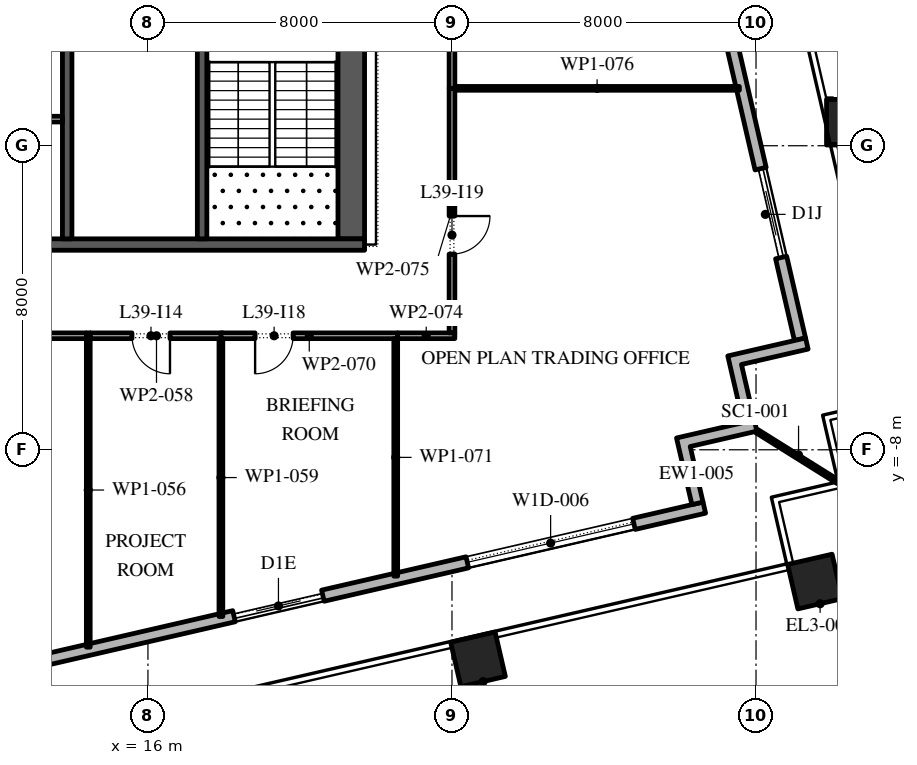
"""IFC4 building model, lengths in metres.
Left out: names, types, materials, properties, quantities, classifications, styles, units other than length and angle.
Written with IfcOpenShell. Run it as: python <this file> out.ifc"""

import sys

from ifc_helpers import new_model, si_unit, direction, frame, frame_2d, origin, origin_2d, place, context, subcontext, project, spatial, polyline, rectangle, outline, extrude, element, fill, save


model = new_model("IFC4")
c1 = context("Model", 3, precision=1e-05, world=origin(), true_north=direction((0.0, 1.0)))
c2 = subcontext(c1, "Body", "Model", "MODEL_VIEW")
j1 = project(units=[si_unit("LENGTHUNIT", "METRE"), si_unit("PLANEANGLEUNIT", "RADIAN")], contexts=[c1])
p1 = place(None, origin())
s1 = spatial("IfcSite", under=j1, at=p1, CompositionType="ELEMENT")
p2 = place(p1, origin())
s2 = spatial("IfcBuilding", under=s1, at=p2, CompositionType="ELEMENT")
p3 = place(p2, frame((0.0, 0.0, 180.0)))
s3 = spatial("IfcBuildingStorey", under=s2, at=p3, CompositionType="ELEMENT", Elevation=180.0)
for number, where, z_axis, x_axis in (
    (1, (24.685, -13.514, 0.0), (0.0, 0.0, 1.0), (0.974, 0.225, 0.0)),
    (2, (33.551, -11.467, 0.0), (0.0, 0.0, 1.0), (0.974, 0.225, 0.0)),
):
    element("IfcColumn", number, at=place(p3, frame(where, z_axis=z_axis, x_axis=x_axis)), inside=s3, PredefinedType="COLUMN", context=c2, shape_type="SweptSolid", body=[
        extrude(rectangle(XDim=1.2, YDim=1.2, at=origin_2d()), origin(), (0.0, 0.0, 1.0), 4.2),
    ])
p4 = place(p3, frame((34.456, 0.619, 0.0), z_axis=(-0.002731884952, 0.01168316756, 0.999928017609), x_axis=(-0.973733900744, -0.227689021567, 0.0)))
e3 = element("IfcColumn", 3, at=p4, inside=s3, PredefinedType="COLUMN", context=c2, shape_type="SweptSolid", body=[
    extrude(rectangle(XDim=1.2, YDim=1.2, at=origin_2d()), origin(), (0.0, 0.0, 1.0), 4.2),
])
p5 = place(p3, frame((-17.592, -20.657, 0.0), z_axis=(0.0, 0.0, 1.0), x_axis=(0.974370243697, 0.224950279389, 0.0)))
e4 = element("IfcWall", 4, at=p5, inside=s3, PredefinedType="STANDARD", context=c2, shape_type="SweptSolid", body=[
    extrude(rectangle(XDim=49.5, YDim=0.3, at=frame_2d((24.75, 0.0))), origin(), (0.0, 0.0, 1.0), 4.0),
])
p6 = place(p5, frame((3.6, 0.0, 0.0)))
e5 = element("IfcOpeningElement", 5, at=p6, cuts=e4, PredefinedType="OPENING", context=c2, shape_type="SweptSolid", body=[
    extrude(rectangle(XDim=2.4, YDim=3.5, at=frame_2d((1.2, 1.75))), frame((0.0, 0.16, 0.0), z_axis=(0.0, -1.0, 0.0), x_axis=(1.0, 0.0, 0.0)), (0.0, 0.0, 1.0), 0.32),
])
p7 = place(p5, frame((9.9, 0.0, 0.45)))
e6 = element("IfcOpeningElement", 6, at=p7, cuts=e4, PredefinedType="OPENING", context=c2, shape_type="SweptSolid", body=[
    extrude(rectangle(XDim=4.5, YDim=2.575, at=frame_2d((2.25, 1.288))), frame((0.0, 0.16, 0.0), z_axis=(0.0, -1.0, 0.0), x_axis=(1.0, 0.0, 0.0)), (0.0, 0.0, 1.0), 0.32),
])
p8 = place(p5, frame((18.2, 0.0, 0.45)))
e7 = element("IfcOpeningElement", 7, at=p8, cuts=e4, PredefinedType="OPENING", context=c2, shape_type="SweptSolid", body=[
    extrude(rectangle(XDim=4.5, YDim=3.05, at=frame_2d((2.25, 1.525))), frame((0.0, 0.16, 0.0), z_axis=(0.0, -1.0, 0.0), x_axis=(1.0, 0.0, 0.0)), (0.0, 0.0, 1.0), 0.32),
])
p9 = place(p5, frame((26.5, 0.0, 0.45)))
e8 = element("IfcOpeningElement", 8, at=p9, cuts=e4, PredefinedType="OPENING", context=c2, shape_type="SweptSolid", body=[
    extrude(rectangle(XDim=4.5, YDim=2.75, at=frame_2d((2.25, 1.375))), frame((0.0, 0.16, 0.0), z_axis=(0.0, -1.0, 0.0), x_axis=(1.0, 0.0, 0.0)), (0.0, 0.0, 1.0), 0.32),
])
p10 = place(p5, frame((36.8, 0.0, 0.0)))
e9 = element("IfcOpeningElement", 9, at=p10, cuts=e4, PredefinedType="OPENING", context=c2, shape_type="SweptSolid", body=[
    extrude(rectangle(XDim=2.4, YDim=3.275, at=frame_2d((1.2, 1.637))), frame((0.0, 0.16, 0.0), z_axis=(0.0, -1.0, 0.0), x_axis=(1.0, 0.0, 0.0)), (0.0, 0.0, 1.0), 0.32),
])
p11 = place(p5, frame((43.1, 0.0, 0.45)))
e10 = element("IfcOpeningElement", 10, at=p11, cuts=e4, PredefinedType="OPENING", context=c2, shape_type="SweptSolid", body=[
    extrude(rectangle(XDim=4.5, YDim=2.875, at=frame_2d((2.25, 1.438))), frame((0.0, 0.16, 0.0), z_axis=(0.0, -1.0, 0.0), x_axis=(1.0, 0.0, 0.0)), (0.0, 0.0, 1.0), 0.32),
])
p12 = place(p3, frame((33.157, -5.092, 0.0), z_axis=(0.0, 0.0, 1.0), x_axis=(-0.224950279389, 0.974370243697, 0.0)))
e11 = element("IfcWall", 11, at=p12, inside=s3, PredefinedType="STANDARD", context=c2, shape_type="SweptSolid", body=[
    extrude(rectangle(XDim=49.5, YDim=0.3, at=frame_2d((24.75, 0.0))), origin(), (0.0, 0.0, 1.0), 4.0),
])
p13 = place(p12, frame((2.207, 0.0, 0.0)))
e12 = element("IfcOpeningElement", 12, at=p13, cuts=e11, PredefinedType="OPENING", context=c2, shape_type="SweptSolid", body=[
    extrude(rectangle(XDim=2.4, YDim=3.125, at=frame_2d((1.2, 1.562))), frame((0.0, 0.16, 0.0), z_axis=(0.0, -1.0, 0.0), x_axis=(1.0, 0.0, 0.0)), (0.0, 0.0, 1.0), 0.32),
])
p14 = place(p12, frame((8.121, 0.0, 0.45)))
e13 = element("IfcOpeningElement", 13, at=p14, cuts=e11, PredefinedType="OPENING", context=c2, shape_type="SweptSolid", body=[
    extrude(rectangle(XDim=4.5, YDim=2.875, at=frame_2d((2.25, 1.438))), frame((0.0, 0.16, 0.0), z_axis=(0.0, -1.0, 0.0), x_axis=(1.0, 0.0, 0.0)), (0.0, 0.0, 1.0), 0.32),
])
p15 = place(p12, frame((15.236, 0.0, 0.45)))
e14 = element("IfcOpeningElement", 14, at=p15, cuts=e11, PredefinedType="OPENING", context=c2, shape_type="SweptSolid", body=[
    extrude(rectangle(XDim=4.5, YDim=2.875, at=frame_2d((2.25, 1.438))), frame((0.0, 0.16, 0.0), z_axis=(0.0, -1.0, 0.0), x_axis=(1.0, 0.0, 0.0)), (0.0, 0.0, 1.0), 0.32),
])
p16 = place(p12, frame((22.35, 0.0, 0.45)))
e15 = element("IfcOpeningElement", 15, at=p16, cuts=e11, PredefinedType="OPENING", context=c2, shape_type="SweptSolid", body=[
    extrude(rectangle(XDim=4.5, YDim=3.0, at=frame_2d((2.25, 1.5))), frame((0.0, 0.16, 0.0), z_axis=(0.0, -1.0, 0.0), x_axis=(1.0, 0.0, 0.0)), (0.0, 0.0, 1.0), 0.32),
])
p17 = place(p12, frame((30.514, 0.0, 0.0)))
e16 = element("IfcOpeningElement", 16, at=p17, cuts=e11, PredefinedType="OPENING", context=c2, shape_type="SweptSolid", body=[
    extrude(rectangle(XDim=2.4, YDim=3.45, at=frame_2d((1.2, 1.725))), frame((0.0, 0.16, 0.0), z_axis=(0.0, -1.0, 0.0), x_axis=(1.0, 0.0, 0.0)), (0.0, 0.0, 1.0), 0.32),
])
p18 = place(p12, frame((36.579, 0.0, 0.45)))
e17 = element("IfcOpeningElement", 17, at=p18, cuts=e11, PredefinedType="OPENING", context=c2, shape_type="SweptSolid", body=[
    extrude(rectangle(XDim=4.5, YDim=3.05, at=frame_2d((2.25, 1.525))), frame((0.0, 0.16, 0.0), z_axis=(0.0, -1.0, 0.0), x_axis=(1.0, 0.0, 0.0)), (0.0, 0.0, 1.0), 0.32),
])
p19 = place(p12, frame((43.693, 0.0, 0.45)))
e18 = element("IfcOpeningElement", 18, at=p19, cuts=e11, PredefinedType="OPENING", context=c2, shape_type="SweptSolid", body=[
    extrude(rectangle(XDim=4.5, YDim=3.05, at=frame_2d((2.25, 1.525))), frame((0.0, 0.16, 0.0), z_axis=(0.0, -1.0, 0.0), x_axis=(1.0, 0.0, 0.0)), (0.0, 0.0, 1.0), 0.32),
])
p20 = place(p3, origin())
e19 = element("IfcWall", 19, at=p20, inside=s3, PredefinedType="STANDARD", context=c2, shape_type="SweptSolid", body=[
    extrude(outline(polyline([(31.662, -7.285), (31.257, -5.531), (33.303, -5.058), (33.371, -5.351), (31.617, -5.756), (32.022, -7.51), (30.268, -7.914), (30.605, -9.376), (30.313, -9.443), (29.908, -7.69), (31.662, -7.285)])), origin(), (0.0, 0.0, 1.0), 4.0),
])
p21 = place(p3, frame((32.022, -7.51, -0.05), z_axis=(0.0, 0.0, 1.0), x_axis=(0.848047176257, -0.529920736377, 0.0)))
e20 = element("IfcWall", 20, at=p21, inside=s3, PredefinedType="STANDARD", context=c2, shape_type="SweptSolid", body=[
    extrude(rectangle(XDim=2.526, YDim=0.1, at=frame_2d((1.263, 0.0))), origin(), (0.0, 0.0, 1.0), 4.05),
])
p22 = place(p3, frame((21.35, -2.45, 0.0), z_axis=(0.0, 0.0, 1.0), x_axis=(0.0, 1.0, 0.0)))
e21 = element("IfcWall", 21, at=p22, inside=s3, PredefinedType="SHEAR", context=c2, shape_type="SweptSolid", body=[
    extrude(rectangle(XDim=27.9, YDim=0.7, at=frame_2d((13.95, 0.0))), origin(), (0.0, 0.0, 1.0), 4.0),
])
p23 = place(p22, frame((5.05, 0.0, 0.0)))
e22 = element("IfcOpeningElement", 22, at=p23, cuts=e21, PredefinedType="OPENING", context=c2, shape_type="SweptSolid", body=[
    extrude(rectangle(XDim=1.2, YDim=2.1, at=frame_2d((0.6, 1.05))), frame((0.0, 0.36, 0.0), z_axis=(0.0, -1.0, 0.0), x_axis=(1.0, 0.0, 0.0)), (0.0, 0.0, 1.0), 0.72),
])
p24 = place(p22, frame((21.65, 0.0, 0.0)))
e23 = element("IfcOpeningElement", 23, at=p24, cuts=e21, PredefinedType="OPENING", context=c2, shape_type="SweptSolid", body=[
    extrude(rectangle(XDim=1.2, YDim=2.1, at=frame_2d((0.6, 1.05))), frame((0.0, 0.36, 0.0), z_axis=(0.0, -1.0, 0.0), x_axis=(1.0, 0.0, 0.0)), (0.0, 0.0, 1.0), 0.72),
])
p25 = place(p3, frame((10.3, -2.6, 0.0), z_axis=(0.0, 0.0, 1.0), x_axis=(1.0, 0.0, 0.0)))
e24 = element("IfcWall", 24, at=p25, inside=s3, PredefinedType="SHEAR", context=c2, shape_type="SweptSolid", body=[
    extrude(rectangle(XDim=11.4, YDim=0.3, at=frame_2d((5.7, 0.0))), origin(), (0.0, 0.0, 1.0), 4.0),
])
p26 = place(p3, frame((17.425, -2.45, 0.0), z_axis=(0.0, 0.0, 1.0), x_axis=(0.0, 1.0, 0.0)))
e25 = element("IfcWall", 25, at=p26, inside=s3, PredefinedType="SHEAR", context=c2, shape_type="SweptSolid", body=[
    extrude(rectangle(XDim=6.3, YDim=0.25, at=frame_2d((3.15, 0.0))), origin(), (0.0, 0.0, 1.0), 4.0),
])
p27 = place(p26, frame((5.05, 0.0, 0.0)))
e26 = element("IfcOpeningElement", 26, at=p27, cuts=e25, PredefinedType="OPENING", context=c2, shape_type="SweptSolid", body=[
    extrude(rectangle(XDim=1.2, YDim=2.1, at=frame_2d((0.6, 1.05))), frame((0.0, 0.135, 0.0), z_axis=(0.0, -1.0, 0.0), x_axis=(1.0, 0.0, 0.0)), (0.0, 0.0, 1.0), 0.27),
])
p28 = place(p3, frame((13.875, -2.45, 0.0), z_axis=(0.0, 0.0, 1.0), x_axis=(0.0, 1.0, 0.0)))
e27 = element("IfcWall", 27, at=p28, inside=s3, PredefinedType="SHEAR", context=c2, shape_type="SweptSolid", body=[
    extrude(rectangle(XDim=21.3, YDim=0.25, at=frame_2d((10.65, 0.0))), origin(), (0.0, 0.0, 1.0), 4.0),
])
p29 = place(p28, frame((16.261, 0.0, 0.0)))
e28 = element("IfcOpeningElement", 28, at=p29, cuts=e27, PredefinedType="OPENING", context=c2, shape_type="SweptSolid", body=[
    extrude(rectangle(XDim=0.9, YDim=2.1, at=frame_2d((0.45, 1.05))), frame((0.0, 0.135, 0.0), z_axis=(0.0, -1.0, 0.0), x_axis=(1.0, 0.0, 0.0)), (0.0, 0.0, 1.0), 0.27),
])
p30 = place(p28, frame((19.325, 0.0, 0.0)))
e29 = element("IfcOpeningElement", 29, at=p30, cuts=e27, PredefinedType="OPENING", context=c2, shape_type="SweptSolid", body=[
    extrude(rectangle(XDim=0.9, YDim=2.1, at=frame_2d((0.45, 1.05))), frame((0.0, 0.135, 0.0), z_axis=(0.0, -1.0, 0.0), x_axis=(1.0, 0.0, 0.0)), (0.0, 0.0, 1.0), 0.27),
])
p31 = place(p28, frame((6.971, 0.0, 0.0)))
e30 = element("IfcOpeningElement", 30, at=p31, cuts=e27, PredefinedType="OPENING", context=c2, shape_type="SweptSolid", body=[
    extrude(rectangle(XDim=1.1, YDim=2.1, at=frame_2d((0.55, 1.05))), frame((0.0, 0.135, 0.0), z_axis=(0.0, -1.0, 0.0), x_axis=(1.0, 0.0, 0.0)), (0.0, 0.0, 1.0), 0.27),
])
p32 = place(p28, frame((9.114, 0.0, 0.0)))
e31 = element("IfcOpeningElement", 31, at=p32, cuts=e27, PredefinedType="OPENING", context=c2, shape_type="SweptSolid", body=[
    extrude(rectangle(XDim=1.1, YDim=2.1, at=frame_2d((0.55, 1.05))), frame((0.0, 0.135, 0.0), z_axis=(0.0, -1.0, 0.0), x_axis=(1.0, 0.0, 0.0)), (0.0, 0.0, 1.0), 0.27),
])
p33 = place(p28, frame((11.257, 0.0, 0.0)))
e32 = element("IfcOpeningElement", 32, at=p33, cuts=e27, PredefinedType="OPENING", context=c2, shape_type="SweptSolid", body=[
    extrude(rectangle(XDim=1.1, YDim=2.1, at=frame_2d((0.55, 1.05))), frame((0.0, 0.135, 0.0), z_axis=(0.0, -1.0, 0.0), x_axis=(1.0, 0.0, 0.0)), (0.0, 0.0, 1.0), 0.27),
])
p34 = place(p28, frame((13.4, 0.0, 0.0)))
e33 = element("IfcOpeningElement", 33, at=p34, cuts=e27, PredefinedType="OPENING", context=c2, shape_type="SweptSolid", body=[
    extrude(rectangle(XDim=1.1, YDim=2.1, at=frame_2d((0.55, 1.05))), frame((0.0, 0.135, 0.0), z_axis=(0.0, -1.0, 0.0), x_axis=(1.0, 0.0, 0.0)), (0.0, 0.0, 1.0), 0.27),
])
p35 = place(p3, frame((11.0, 0.7, 0.0), z_axis=(0.0, 0.0, 1.0), x_axis=(1.0, 0.0, 0.0)))
e34 = element("IfcWall", 34, at=p35, inside=s3, PredefinedType="PARTITIONING", context=c2, shape_type="SweptSolid", body=[
    extrude(rectangle(XDim=2.75, YDim=0.15, at=frame_2d((1.375, 0.0))), origin(), (0.0, 0.0, 1.0), 4.0),
])
p36 = place(p3, frame((14.43, -13.193, 0.0), z_axis=(0.0, 0.0, 1.0), x_axis=(0.0, 1.0, 0.0)))
e35 = element("IfcWall", 35, at=p36, inside=s3, PredefinedType="PARTITIONING", context=c2, shape_type="SweptSolid", body=[
    extrude(rectangle(XDim=8.268, YDim=0.1, at=frame_2d((4.134, 0.0))), origin(), (0.0, 0.0, 1.0), 4.0),
])
p37 = place(p3, frame((14.38, -5.0, 0.0), z_axis=(0.0, 0.0, 1.0), x_axis=(-1.0, 0.0, 0.0)))
e36 = element("IfcWall", 36, at=p37, inside=s3, PredefinedType="PARTITIONING", context=c2, shape_type="SweptSolid", body=[
    extrude(rectangle(XDim=4.38, YDim=0.15, at=frame_2d((2.19, 0.0))), origin(), (0.0, 0.0, 1.0), 4.0),
])
p38 = place(p37, frame((1.73, 0.0, 0.0)))
e37 = element("IfcOpeningElement", 37, at=p38, cuts=e36, PredefinedType="OPENING", context=c2, shape_type="SweptSolid", body=[
    extrude(rectangle(XDim=1.0, YDim=2.1, at=frame_2d((0.5, 1.05))), frame((0.0, 0.085, 0.0), z_axis=(0.0, -1.0, 0.0), x_axis=(1.0, 0.0, 0.0)), (0.0, 0.0, 1.0), 0.17),
])
p39 = place(p3, frame((17.97, -5.0, 0.0), z_axis=(0.0, 0.0, 1.0), x_axis=(-1.0, 0.0, 0.0)))
e38 = element("IfcWall", 38, at=p39, inside=s3, PredefinedType="PARTITIONING", context=c2, shape_type="SweptSolid", body=[
    extrude(rectangle(XDim=3.49, YDim=0.15, at=frame_2d((1.745, 0.0))), origin(), (0.0, 0.0, 1.0), 4.0),
])
p40 = place(p39, frame((1.39, 0.0, 0.0)))
e39 = element("IfcOpeningElement", 39, at=p40, cuts=e38, PredefinedType="OPENING", context=c2, shape_type="SweptSolid", body=[
    extrude(rectangle(XDim=1.0, YDim=2.1, at=frame_2d((0.5, 1.05))), frame((0.0, 0.085, 0.0), z_axis=(0.0, -1.0, 0.0), x_axis=(1.0, 0.0, 0.0)), (0.0, 0.0, 1.0), 0.17),
])
p41 = place(p3, frame((17.92, -5.075, 0.0), z_axis=(0.0, 0.0, 1.0), x_axis=(0.0, -1.0, 0.0)))
e40 = element("IfcWall", 40, at=p41, inside=s3, PredefinedType="PARTITIONING", context=c2, shape_type="SweptSolid", body=[
    extrude(rectangle(XDim=7.312, YDim=0.1, at=frame_2d((3.656, 0.0))), origin(), (0.0, 0.0, 1.0), 4.0),
])
p42 = place(p3, frame((22.57, -5.0, 0.0), z_axis=(0.0, 0.0, 1.0), x_axis=(-1.0, 0.0, 0.0)))
e41 = element("IfcWall", 41, at=p42, inside=s3, PredefinedType="PARTITIONING", context=c2, shape_type="SweptSolid", body=[
    extrude(rectangle(XDim=4.65, YDim=0.15, at=frame_2d((2.325, 0.0))), origin(), (0.0, 0.0, 1.0), 4.0),
])
p43 = place(p42, frame((2.75, 0.0, 0.0)))
e42 = element("IfcOpeningElement", 42, at=p43, cuts=e41, PredefinedType="OPENING", context=c2, shape_type="SweptSolid", body=[
    extrude(rectangle(XDim=1.0, YDim=2.1, at=frame_2d((0.5, 1.05))), frame((0.0, 0.085, 0.0), z_axis=(0.0, -1.0, 0.0), x_axis=(1.0, 0.0, 0.0)), (0.0, 0.0, 1.0), 0.17),
])
p44 = place(p3, frame((22.52, -5.075, 0.0), z_axis=(0.0, 0.0, 1.0), x_axis=(0.0, -1.0, 0.0)))
e43 = element("IfcWall", 43, at=p44, inside=s3, PredefinedType="PARTITIONING", context=c2, shape_type="SweptSolid", body=[
    extrude(rectangle(XDim=6.25, YDim=0.1, at=frame_2d((3.125, 0.0))), origin(), (0.0, 0.0, 1.0), 4.0),
])
p45 = place(p3, frame((24.075, -5.0, 0.0), z_axis=(0.0, 0.0, 1.0), x_axis=(-1.0, 0.0, 0.0)))
e44 = element("IfcWall", 44, at=p45, inside=s3, PredefinedType="PARTITIONING", context=c2, shape_type="SweptSolid", body=[
    extrude(rectangle(XDim=1.505, YDim=0.15, at=frame_2d((0.752, 0.0))), origin(), (0.0, 0.0, 1.0), 4.0),
])
p46 = place(p3, frame((24.0, 1.51, 0.0), z_axis=(0.0, 0.0, 1.0), x_axis=(0.0, -1.0, 0.0)))
e45 = element("IfcWall", 45, at=p46, inside=s3, PredefinedType="PARTITIONING", context=c2, shape_type="SweptSolid", body=[
    extrude(rectangle(XDim=6.435, YDim=0.15, at=frame_2d((3.218, 0.0))), origin(), (0.0, 0.0, 1.0), 4.0),
])
p47 = place(p46, frame((3.36, 0.0, 0.0)))
e46 = element("IfcOpeningElement", 46, at=p47, cuts=e45, PredefinedType="OPENING", context=c2, shape_type="SweptSolid", body=[
    extrude(rectangle(XDim=1.0, YDim=2.1, at=frame_2d((0.5, 1.05))), frame((0.0, 0.085, 0.0), z_axis=(0.0, -1.0, 0.0), x_axis=(1.0, 0.0, 0.0)), (0.0, 0.0, 1.0), 0.17),
])
p48 = place(p3, frame((24.075, 1.51, 0.0), z_axis=(0.0, 0.0, 1.0), x_axis=(1.0, 0.0, 0.0)))
e47 = element("IfcWall", 47, at=p48, inside=s3, PredefinedType="PARTITIONING", context=c2, shape_type="SweptSolid", body=[
    extrude(rectangle(XDim=7.487, YDim=0.1, at=frame_2d((3.744, 0.0))), origin(), (0.0, 0.0, 1.0), 4.0),
])
p49 = place(p3, frame((24.0, 8.5, 0.0), z_axis=(0.0, 0.0, 1.0), x_axis=(0.0, -1.0, 0.0)))
e48 = element("IfcWall", 48, at=p49, inside=s3, PredefinedType="PARTITIONING", context=c2, shape_type="SweptSolid", body=[
    extrude(rectangle(XDim=6.99, YDim=0.15, at=frame_2d((3.495, 0.0))), origin(), (0.0, 0.0, 1.0), 4.0),
])
p50 = place(p49, frame((1.59, 0.0, 0.0)))
e49 = element("IfcOpeningElement", 49, at=p50, cuts=e48, PredefinedType="OPENING", context=c2, shape_type="SweptSolid", body=[
    extrude(rectangle(XDim=1.0, YDim=2.1, at=frame_2d((0.5, 1.05))), frame((0.0, 0.085, 0.0), z_axis=(0.0, -1.0, 0.0), x_axis=(1.0, 0.0, 0.0)), (0.0, 0.0, 1.0), 0.17),
])
p51 = place(p10, origin())
e50 = element("IfcDoor", 50, at=p51, inside=s3, OperationType="DOUBLE_DOOR_SLIDING", PredefinedType="DOOR", context=c2, shape_type="SweptSolid", body=[
    extrude(rectangle(XDim=2.4, YDim=3.275, at=frame_2d((1.2, 1.637))), frame((0.0, 0.025, 0.0), z_axis=(0.0, -1.0, 0.0), x_axis=(1.0, 0.0, 0.0)), (0.0, 0.0, 1.0), 0.05),
])
fill(e9, e50)
p52 = place(p11, origin())
e51 = element("IfcWindow", 51, at=p52, inside=s3, PartitioningType="DOUBLE_PANEL_VERTICAL", PredefinedType="WINDOW", context=c2, shape_type="SweptSolid", body=[
    extrude(rectangle(XDim=4.5, YDim=2.875, at=frame_2d((2.25, 1.438))), frame((0.0, 0.03, 0.0), z_axis=(0.0, -1.0, 0.0), x_axis=(1.0, 0.0, 0.0)), (0.0, 0.0, 1.0), 0.06),
])
fill(e10, e51)
p53 = place(p13, origin())
e52 = element("IfcDoor", 52, at=p53, inside=s3, OperationType="DOUBLE_DOOR_SLIDING", PredefinedType="DOOR", context=c2, shape_type="SweptSolid", body=[
    extrude(rectangle(XDim=2.4, YDim=3.125, at=frame_2d((1.2, 1.562))), frame((0.0, 0.025, 0.0), z_axis=(0.0, -1.0, 0.0), x_axis=(1.0, 0.0, 0.0)), (0.0, 0.0, 1.0), 0.05),
])
fill(e12, e52)
p54 = place(p40, origin())
e53 = element("IfcDoor", 53, at=p54, inside=s3, OperationType="SINGLE_SWING_RIGHT", PredefinedType="DOOR", context=c2, shape_type="SweptSolid", body=[
    extrude(rectangle(XDim=1.0, YDim=2.1, at=frame_2d((0.5, 1.05))), frame((0.0, 0.025, 0.0), z_axis=(0.0, -1.0, 0.0), x_axis=(1.0, 0.0, 0.0)), (0.0, 0.0, 1.0), 0.05),
])
fill(e39, e53)
p55 = place(p43, origin())
e54 = element("IfcDoor", 54, at=p55, inside=s3, OperationType="SINGLE_SWING_LEFT", PredefinedType="DOOR", context=c2, shape_type="SweptSolid", body=[
    extrude(rectangle(XDim=1.0, YDim=2.1, at=frame_2d((0.5, 1.05))), frame((0.0, 0.025, 0.0), z_axis=(0.0, -1.0, 0.0), x_axis=(1.0, 0.0, 0.0)), (0.0, 0.0, 1.0), 0.05),
])
fill(e42, e54)
p56 = place(p47, origin())
e55 = element("IfcDoor", 55, at=p56, inside=s3, OperationType="SINGLE_SWING_RIGHT", PredefinedType="DOOR", context=c2, shape_type="SweptSolid", body=[
    extrude(rectangle(XDim=1.0, YDim=2.1, at=frame_2d((0.5, 1.05))), frame((0.0, 0.025, 0.0), z_axis=(0.0, -1.0, 0.0), x_axis=(1.0, 0.0, 0.0)), (0.0, 0.0, 1.0), 0.05),
])
fill(e46, e55)
save(model, sys.argv[1])
